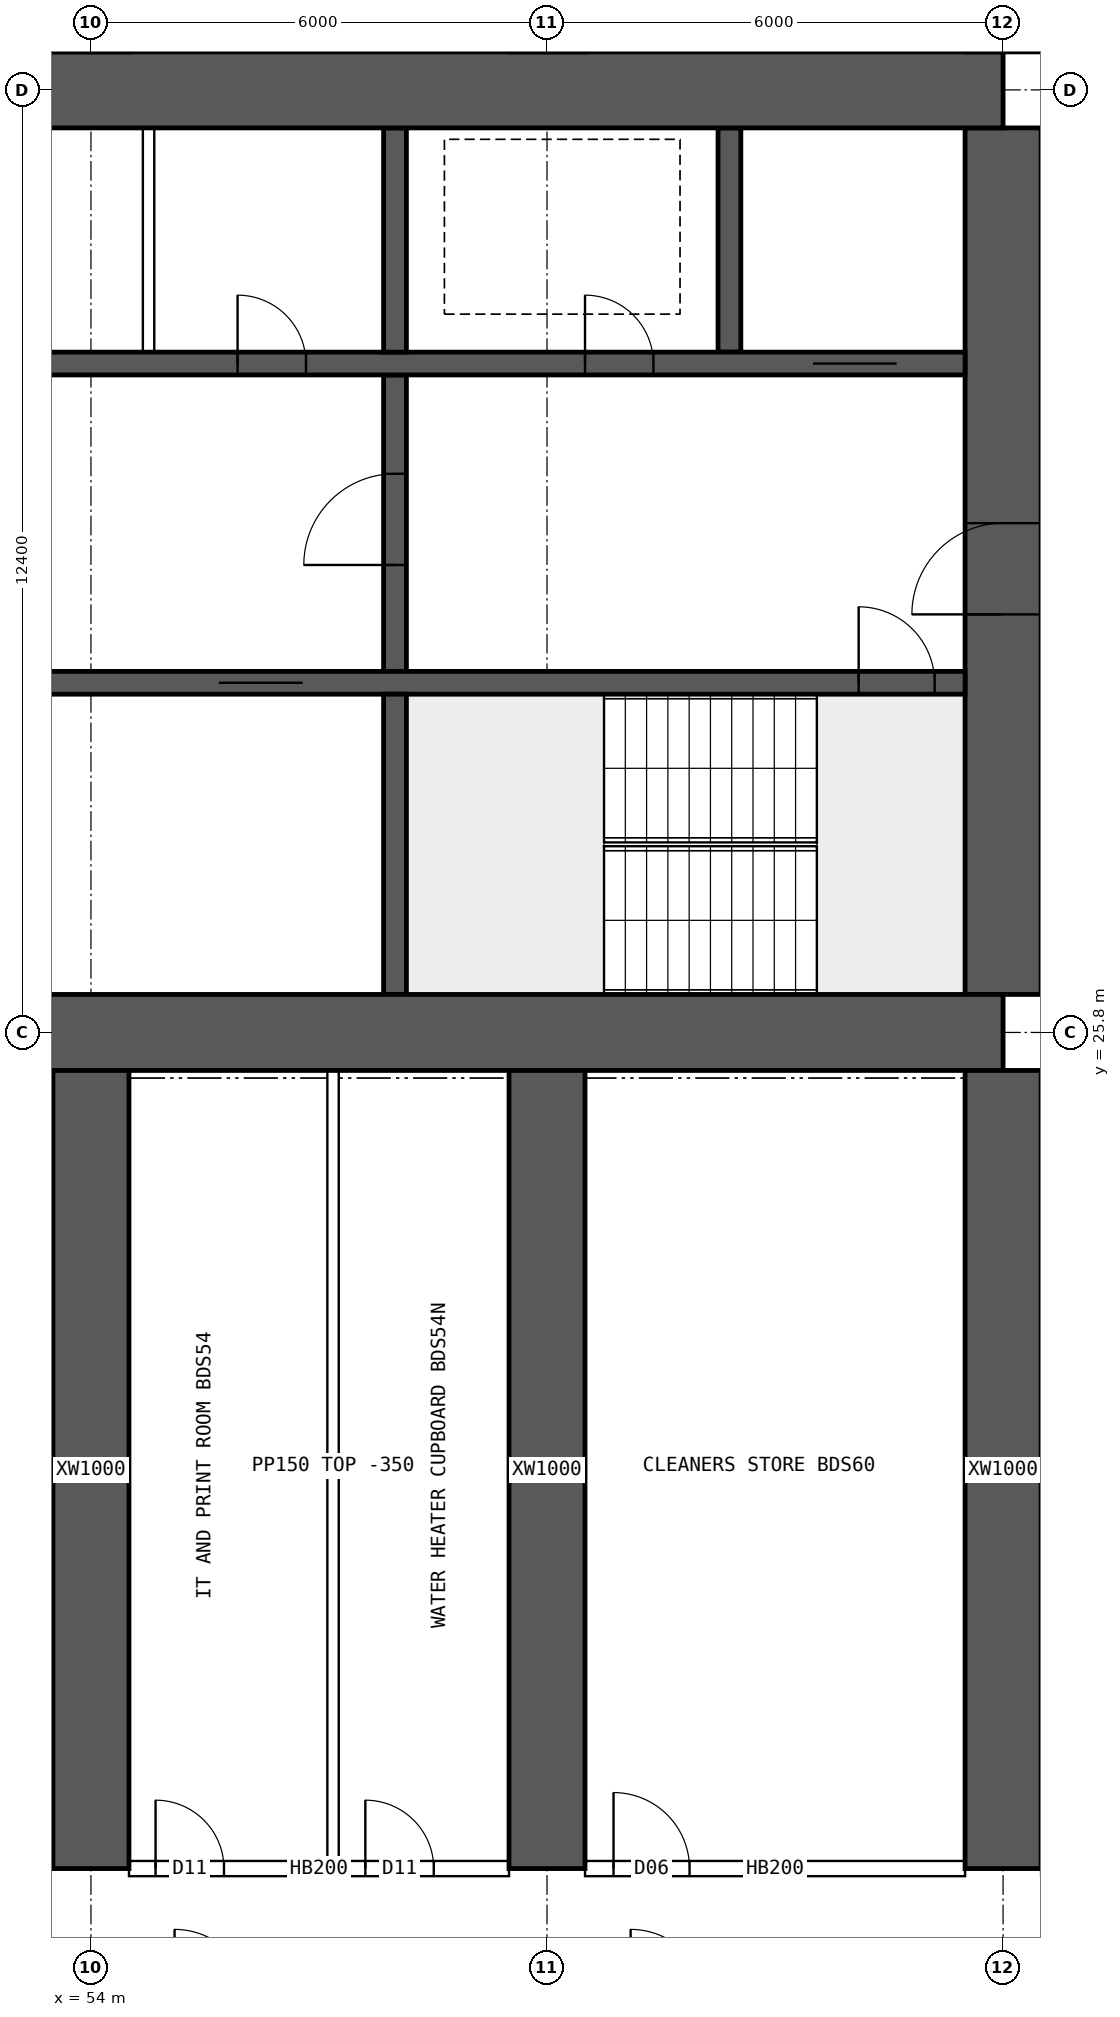
"""IFC4 building model, lengths in metres.
Left out: names, types, materials, properties, quantities, classifications, styles, units other than length and angle.
Written with IfcOpenShell. Run it as: python <this file> out.ifc"""

import sys

from ifc_helpers import new_model, si_unit, direction, frame, frame_2d, origin, place, context, subcontext, project, spatial, rectangle, extrude, element, fill, save


model = new_model("IFC4")
c1 = context("Model", 3, precision=1e-05, world=origin(), true_north=direction((0.0, 1.0)))
c2 = subcontext(c1, "Body", "Model", "MODEL_VIEW")
j1 = project(units=[si_unit("LENGTHUNIT", "METRE"), si_unit("PLANEANGLEUNIT", "RADIAN")], contexts=[c1])
p1 = place(None, origin())
s1 = spatial("IfcSite", under=j1, at=p1, CompositionType="ELEMENT")
p2 = place(p1, origin())
s2 = spatial("IfcBuilding", under=s1, at=p2, CompositionType="ELEMENT")
p3 = place(p2, frame((0.0, 0.0, 65.2)))
s3 = spatial("IfcBuildingStorey", under=s2, at=p3, CompositionType="ELEMENT", Elevation=65.2)
for number, where, z_axis, x_axis in (
    (1, (18.0, 25.8, 0.0), (0.0, 0.0, 1.0), (1.0, 0.0, 0.0)),
    (2, (18.0, 38.2, 0.0), (0.0, 0.0, 1.0), (1.0, 0.0, 0.0)),
):
    element("IfcWall", number, at=place(p3, frame(where, z_axis=z_axis, x_axis=x_axis)), inside=s3, PredefinedType="SHEAR", context=c2, shape_type="SweptSolid", body=[
        extrude(rectangle(XDim=48.0, YDim=1.0, at=frame_2d((24.0, 0.0))), origin(), (0.0, 0.0, 1.0), 3.75),
    ])
p4 = place(p3, frame((66.0, 26.3, 0.0), z_axis=(0.0, 0.0, 1.0), x_axis=(0.0, 1.0, 0.0)))
e3 = element("IfcWall", 3, at=p4, inside=s3, PredefinedType="SHEAR", context=c2, shape_type="SweptSolid", body=[
    extrude(rectangle(XDim=11.4, YDim=1.0, at=frame_2d((5.7, 0.0))), origin(), (0.0, 0.0, 1.0), 3.75),
])
p5 = place(p4, frame((5.0, 0.0, 0.0)))
e4 = element("IfcOpeningElement", 4, at=p5, cuts=e3, PredefinedType="OPENING", context=c2, shape_type="SweptSolid", body=[
    extrude(rectangle(XDim=1.2, YDim=2.1, at=frame_2d((0.6, 1.05))), frame((0.0, 0.51, 0.0), z_axis=(0.0, -1.0, 0.0), x_axis=(1.0, 0.0, 0.0)), (0.0, 0.0, 1.0), 1.02),
])
p6 = place(p3, frame((18.5, 30.4, 0.0), z_axis=(0.0, 0.0, 1.0), x_axis=(1.0, 0.0, 0.0)))
e5 = element("IfcWall", 5, at=p6, inside=s3, PredefinedType="SHEAR", context=c2, shape_type="SweptSolid", body=[
    extrude(rectangle(XDim=47.0, YDim=0.3, at=frame_2d((23.5, 0.0))), origin(), (0.0, 0.0, 1.0), 3.75),
])
p7 = place(p6, frame((0.4, 0.0, 0.0)))
e6 = element("IfcOpeningElement", 6, at=p7, cuts=e5, PredefinedType="OPENING", context=c2, shape_type="SweptSolid", body=[
    extrude(rectangle(XDim=1.0, YDim=2.1, at=frame_2d((0.5, 1.05))), frame((0.0, 0.16, 0.0), z_axis=(0.0, -1.0, 0.0), x_axis=(1.0, 0.0, 0.0)), (0.0, 0.0, 1.0), 0.32),
])
p8 = place(p6, frame((45.6, 0.0, 0.0)))
e7 = element("IfcOpeningElement", 7, at=p8, cuts=e5, PredefinedType="OPENING", context=c2, shape_type="SweptSolid", body=[
    extrude(rectangle(XDim=1.0, YDim=2.1, at=frame_2d((0.5, 1.05))), frame((0.0, 0.16, 0.0), z_axis=(0.0, -1.0, 0.0), x_axis=(1.0, 0.0, 0.0)), (0.0, 0.0, 1.0), 0.32),
])
p9 = place(p6, frame((8.25, 0.0, 0.0)))
e8 = element("IfcOpeningElement", 8, at=p9, cuts=e5, PredefinedType="OPENING", context=c2, shape_type="SweptSolid", body=[
    extrude(rectangle(XDim=1.1, YDim=2.1, at=frame_2d((0.55, 1.05))), frame((0.0, 0.16, 0.0), z_axis=(0.0, -1.0, 0.0), x_axis=(1.0, 0.0, 0.0)), (0.0, 0.0, 1.0), 0.32),
])
p10 = place(p6, frame((10.85, 0.0, 0.0)))
e9 = element("IfcOpeningElement", 9, at=p10, cuts=e5, PredefinedType="OPENING", context=c2, shape_type="SweptSolid", body=[
    extrude(rectangle(XDim=1.1, YDim=2.1, at=frame_2d((0.55, 1.05))), frame((0.0, 0.16, 0.0), z_axis=(0.0, -1.0, 0.0), x_axis=(1.0, 0.0, 0.0)), (0.0, 0.0, 1.0), 0.32),
])
p11 = place(p6, frame((13.45, 0.0, 0.0)))
e10 = element("IfcOpeningElement", 10, at=p11, cuts=e5, PredefinedType="OPENING", context=c2, shape_type="SweptSolid", body=[
    extrude(rectangle(XDim=1.1, YDim=2.1, at=frame_2d((0.55, 1.05))), frame((0.0, 0.16, 0.0), z_axis=(0.0, -1.0, 0.0), x_axis=(1.0, 0.0, 0.0)), (0.0, 0.0, 1.0), 0.32),
])
p12 = place(p6, frame((16.05, 0.0, 0.0)))
e11 = element("IfcOpeningElement", 11, at=p12, cuts=e5, PredefinedType="OPENING", context=c2, shape_type="SweptSolid", body=[
    extrude(rectangle(XDim=1.1, YDim=2.1, at=frame_2d((0.55, 1.05))), frame((0.0, 0.16, 0.0), z_axis=(0.0, -1.0, 0.0), x_axis=(1.0, 0.0, 0.0)), (0.0, 0.0, 1.0), 0.32),
])
p13 = place(p6, frame((30.117, 0.0, 0.0)))
e12 = element("IfcOpeningElement", 12, at=p13, cuts=e5, PredefinedType="OPENING", context=c2, shape_type="SweptSolid", body=[
    extrude(rectangle(XDim=1.1, YDim=2.1, at=frame_2d((0.55, 1.05))), frame((0.0, 0.16, 0.0), z_axis=(0.0, -1.0, 0.0), x_axis=(1.0, 0.0, 0.0)), (0.0, 0.0, 1.0), 0.32),
])
p14 = place(p6, frame((33.65, 0.0, 0.0)))
e13 = element("IfcOpeningElement", 13, at=p14, cuts=e5, PredefinedType="OPENING", context=c2, shape_type="SweptSolid", body=[
    extrude(rectangle(XDim=1.1, YDim=2.1, at=frame_2d((0.55, 1.05))), frame((0.0, 0.16, 0.0), z_axis=(0.0, -1.0, 0.0), x_axis=(1.0, 0.0, 0.0)), (0.0, 0.0, 1.0), 0.32),
])
p15 = place(p6, frame((37.183, 0.0, 0.0)))
e14 = element("IfcOpeningElement", 14, at=p15, cuts=e5, PredefinedType="OPENING", context=c2, shape_type="SweptSolid", body=[
    extrude(rectangle(XDim=1.1, YDim=2.1, at=frame_2d((0.55, 1.05))), frame((0.0, 0.16, 0.0), z_axis=(0.0, -1.0, 0.0), x_axis=(1.0, 0.0, 0.0)), (0.0, 0.0, 1.0), 0.32),
])
p16 = place(p3, frame((18.5, 34.6, 0.0), z_axis=(0.0, 0.0, 1.0), x_axis=(1.0, 0.0, 0.0)))
e15 = element("IfcWall", 15, at=p16, inside=s3, PredefinedType="SHEAR", context=c2, shape_type="SweptSolid", body=[
    extrude(rectangle(XDim=47.0, YDim=0.3, at=frame_2d((23.5, 0.0))), origin(), (0.0, 0.0, 1.0), 3.75),
])
p17 = place(p16, frame((0.9, 0.0, 0.0)))
e16 = element("IfcOpeningElement", 16, at=p17, cuts=e15, PredefinedType="OPENING", context=c2, shape_type="SweptSolid", body=[
    extrude(rectangle(XDim=1.1, YDim=2.1, at=frame_2d((0.55, 1.05))), frame((0.0, 0.16, 0.0), z_axis=(0.0, -1.0, 0.0), x_axis=(1.0, 0.0, 0.0)), (0.0, 0.0, 1.0), 0.32),
])
p18 = place(p16, frame((45.0, 0.0, 0.0)))
e17 = element("IfcOpeningElement", 17, at=p18, cuts=e15, PredefinedType="OPENING", context=c2, shape_type="SweptSolid", body=[
    extrude(rectangle(XDim=1.1, YDim=2.1, at=frame_2d((0.55, 1.05))), frame((0.0, 0.16, 0.0), z_axis=(0.0, -1.0, 0.0), x_axis=(1.0, 0.0, 0.0)), (0.0, 0.0, 1.0), 0.32),
])
p19 = place(p16, frame((4.1, 0.0, 0.0)))
e18 = element("IfcOpeningElement", 18, at=p19, cuts=e15, PredefinedType="OPENING", context=c2, shape_type="SweptSolid", body=[
    extrude(rectangle(XDim=0.9, YDim=2.1, at=frame_2d((0.45, 1.05))), frame((0.0, 0.16, 0.0), z_axis=(0.0, -1.0, 0.0), x_axis=(1.0, 0.0, 0.0)), (0.0, 0.0, 1.0), 0.32),
])
p20 = place(p16, frame((42.0, 0.0, 0.0)))
e19 = element("IfcOpeningElement", 19, at=p20, cuts=e15, PredefinedType="OPENING", context=c2, shape_type="SweptSolid", body=[
    extrude(rectangle(XDim=0.9, YDim=2.1, at=frame_2d((0.45, 1.05))), frame((0.0, 0.16, 0.0), z_axis=(0.0, -1.0, 0.0), x_axis=(1.0, 0.0, 0.0)), (0.0, 0.0, 1.0), 0.32),
])
p21 = place(p16, frame((8.875, 0.0, 0.0)))
e20 = element("IfcOpeningElement", 20, at=p21, cuts=e15, PredefinedType="OPENING", context=c2, shape_type="SweptSolid", body=[
    extrude(rectangle(XDim=0.9, YDim=2.1, at=frame_2d((0.45, 1.05))), frame((0.0, 0.16, 0.0), z_axis=(0.0, -1.0, 0.0), x_axis=(1.0, 0.0, 0.0)), (0.0, 0.0, 1.0), 0.32),
])
p22 = place(p16, frame((12.849, 0.0, 0.0)))
e21 = element("IfcOpeningElement", 21, at=p22, cuts=e15, PredefinedType="OPENING", context=c2, shape_type="SweptSolid", body=[
    extrude(rectangle(XDim=0.9, YDim=2.1, at=frame_2d((0.45, 1.05))), frame((0.0, 0.16, 0.0), z_axis=(0.0, -1.0, 0.0), x_axis=(1.0, 0.0, 0.0)), (0.0, 0.0, 1.0), 0.32),
])
p23 = place(p16, frame((16.496, 0.0, 0.0)))
e22 = element("IfcOpeningElement", 22, at=p23, cuts=e15, PredefinedType="OPENING", context=c2, shape_type="SweptSolid", body=[
    extrude(rectangle(XDim=0.9, YDim=2.1, at=frame_2d((0.45, 1.05))), frame((0.0, 0.16, 0.0), z_axis=(0.0, -1.0, 0.0), x_axis=(1.0, 0.0, 0.0)), (0.0, 0.0, 1.0), 0.32),
])
p24 = place(p16, frame((20.255, 0.0, 0.0)))
e23 = element("IfcOpeningElement", 23, at=p24, cuts=e15, PredefinedType="OPENING", context=c2, shape_type="SweptSolid", body=[
    extrude(rectangle(XDim=0.9, YDim=2.1, at=frame_2d((0.45, 1.05))), frame((0.0, 0.16, 0.0), z_axis=(0.0, -1.0, 0.0), x_axis=(1.0, 0.0, 0.0)), (0.0, 0.0, 1.0), 0.32),
])
p25 = place(p16, frame((24.661, 0.0, 0.0)))
e24 = element("IfcOpeningElement", 24, at=p25, cuts=e15, PredefinedType="OPENING", context=c2, shape_type="SweptSolid", body=[
    extrude(rectangle(XDim=0.9, YDim=2.1, at=frame_2d((0.45, 1.05))), frame((0.0, 0.16, 0.0), z_axis=(0.0, -1.0, 0.0), x_axis=(1.0, 0.0, 0.0)), (0.0, 0.0, 1.0), 0.32),
])
p26 = place(p16, frame((27.458, 0.0, 0.0)))
e25 = element("IfcOpeningElement", 25, at=p26, cuts=e15, PredefinedType="OPENING", context=c2, shape_type="SweptSolid", body=[
    extrude(rectangle(XDim=0.9, YDim=2.1, at=frame_2d((0.45, 1.05))), frame((0.0, 0.16, 0.0), z_axis=(0.0, -1.0, 0.0), x_axis=(1.0, 0.0, 0.0)), (0.0, 0.0, 1.0), 0.32),
])
p27 = place(p16, frame((29.831, 0.0, 0.0)))
e26 = element("IfcOpeningElement", 26, at=p27, cuts=e15, PredefinedType="OPENING", context=c2, shape_type="SweptSolid", body=[
    extrude(rectangle(XDim=0.9, YDim=2.1, at=frame_2d((0.45, 1.05))), frame((0.0, 0.16, 0.0), z_axis=(0.0, -1.0, 0.0), x_axis=(1.0, 0.0, 0.0)), (0.0, 0.0, 1.0), 0.32),
])
p28 = place(p16, frame((33.68, 0.0, 0.0)))
e27 = element("IfcOpeningElement", 27, at=p28, cuts=e15, PredefinedType="OPENING", context=c2, shape_type="SweptSolid", body=[
    extrude(rectangle(XDim=0.9, YDim=2.1, at=frame_2d((0.45, 1.05))), frame((0.0, 0.16, 0.0), z_axis=(0.0, -1.0, 0.0), x_axis=(1.0, 0.0, 0.0)), (0.0, 0.0, 1.0), 0.32),
])
p29 = place(p16, frame((37.429, 0.0, 0.0)))
e28 = element("IfcOpeningElement", 28, at=p29, cuts=e15, PredefinedType="OPENING", context=c2, shape_type="SweptSolid", body=[
    extrude(rectangle(XDim=0.9, YDim=2.1, at=frame_2d((0.45, 1.05))), frame((0.0, 0.16, 0.0), z_axis=(0.0, -1.0, 0.0), x_axis=(1.0, 0.0, 0.0)), (0.0, 0.0, 1.0), 0.32),
])
p30 = place(p3, frame((58.0, 26.3, 0.0), z_axis=(0.0, 0.0, 1.0), x_axis=(0.0, 1.0, 0.0)))
e29 = element("IfcWall", 29, at=p30, inside=s3, PredefinedType="SHEAR", context=c2, shape_type="SweptSolid", body=[
    extrude(rectangle(XDim=3.95, YDim=0.3, at=frame_2d((1.975, 0.0))), origin(), (0.0, 0.0, 1.0), 3.75),
])
p31 = place(p3, frame((58.0, 30.55, 0.0), z_axis=(0.0, 0.0, 1.0), x_axis=(0.0, 1.0, 0.0)))
e30 = element("IfcWall", 30, at=p31, inside=s3, PredefinedType="SHEAR", context=c2, shape_type="SweptSolid", body=[
    extrude(rectangle(XDim=3.9, YDim=0.3, at=frame_2d((1.95, 0.0))), origin(), (0.0, 0.0, 1.0), 3.75),
])
p32 = place(p31, frame((1.4, 0.0, 0.0)))
e31 = element("IfcOpeningElement", 31, at=p32, cuts=e30, PredefinedType="OPENING", context=c2, shape_type="SweptSolid", body=[
    extrude(rectangle(XDim=1.2, YDim=2.1, at=frame_2d((0.6, 1.05))), frame((0.0, 0.16, 0.0), z_axis=(0.0, -1.0, 0.0), x_axis=(1.0, 0.0, 0.0)), (0.0, 0.0, 1.0), 0.32),
])
for number, where, z_axis, x_axis in (
    (32, (62.4, 34.75, 0.0), (0.0, 0.0, 1.0), (0.0, 1.0, 0.0)),
    (33, (58.0, 34.75, 0.0), (0.0, 0.0, 1.0), (0.0, 1.0, 0.0)),
):
    element("IfcWall", number, at=place(p3, frame(where, z_axis=z_axis, x_axis=x_axis)), inside=s3, PredefinedType="SHEAR", context=c2, shape_type="SweptSolid", body=[
        extrude(rectangle(XDim=2.95, YDim=0.3, at=frame_2d((1.475, 0.0))), origin(), (0.0, 0.0, 1.0), 3.75),
    ])
for number, where, z_axis, x_axis in (
    (34, (54.0, 14.8, 0.0), (0.0, 0.0, 1.0), (0.0, 1.0, 0.0)),
    (35, (60.0, 14.8, 0.0), (0.0, 0.0, 1.0), (0.0, 1.0, 0.0)),
    (36, (66.0, 14.8, 0.0), (0.0, 0.0, 1.0), (0.0, 1.0, 0.0)),
):
    element("IfcWall", number, at=place(p3, frame(where, z_axis=z_axis, x_axis=x_axis)), inside=s3, PredefinedType="SHEAR", context=c2, shape_type="SweptSolid", body=[
        extrude(rectangle(XDim=10.5, YDim=1.0, at=frame_2d((5.25, 0.0))), origin(), (0.0, 0.0, 1.0), 3.75),
    ])
p33 = place(p3, frame((54.758, 34.75, 0.0), z_axis=(0.0, 0.0, 1.0), x_axis=(0.0, 1.0, 0.0)))
e37 = element("IfcWall", 37, at=p33, inside=s3, PredefinedType="SOLIDWALL", context=c2, shape_type="SweptSolid", body=[
    extrude(rectangle(XDim=2.95, YDim=0.15, at=frame_2d((1.475, 0.0))), origin(), (0.0, 0.0, 1.0), 3.4),
])
p34 = place(p3, frame((54.5, 14.8, 0.0), z_axis=(0.0, 0.0, 1.0), x_axis=(1.0, 0.0, 0.0)))
e38 = element("IfcWall", 38, at=p34, inside=s3, PredefinedType="SOLIDWALL", context=c2, shape_type="SweptSolid", body=[
    extrude(rectangle(XDim=5.0, YDim=0.2, at=frame_2d((2.5, 0.0))), origin(), (0.0, 0.0, 1.0), 3.4),
])
p35 = place(p34, frame((0.35, 0.0, 0.0)))
e39 = element("IfcOpeningElement", 39, at=p35, cuts=e38, PredefinedType="OPENING", context=c2, shape_type="SweptSolid", body=[
    extrude(rectangle(XDim=0.9, YDim=2.1, at=frame_2d((0.45, 1.05))), frame((0.0, 0.11, 0.0), z_axis=(0.0, -1.0, 0.0), x_axis=(1.0, 0.0, 0.0)), (0.0, 0.0, 1.0), 0.22),
])
p36 = place(p34, frame((3.11, 0.0, 0.0)))
e40 = element("IfcOpeningElement", 40, at=p36, cuts=e38, PredefinedType="OPENING", context=c2, shape_type="SweptSolid", body=[
    extrude(rectangle(XDim=0.9, YDim=2.1, at=frame_2d((0.45, 1.05))), frame((0.0, 0.11, 0.0), z_axis=(0.0, -1.0, 0.0), x_axis=(1.0, 0.0, 0.0)), (0.0, 0.0, 1.0), 0.22),
])
p37 = place(p3, frame((60.5, 14.8, 0.0), z_axis=(0.0, 0.0, 1.0), x_axis=(1.0, 0.0, 0.0)))
e41 = element("IfcWall", 41, at=p37, inside=s3, PredefinedType="SOLIDWALL", context=c2, shape_type="SweptSolid", body=[
    extrude(rectangle(XDim=5.0, YDim=0.2, at=frame_2d((2.5, 0.0))), origin(), (0.0, 0.0, 1.0), 3.4),
])
p38 = place(p37, frame((0.375, 0.0, 0.0)))
e42 = element("IfcOpeningElement", 42, at=p38, cuts=e41, PredefinedType="OPENING", context=c2, shape_type="SweptSolid", body=[
    extrude(rectangle(XDim=1.0, YDim=2.1, at=frame_2d((0.5, 1.05))), frame((0.0, 0.11, 0.0), z_axis=(0.0, -1.0, 0.0), x_axis=(1.0, 0.0, 0.0)), (0.0, 0.0, 1.0), 0.22),
])
p39 = place(p3, frame((57.185, 14.9, 0.0), z_axis=(0.0, 0.0, 1.0), x_axis=(0.0, 1.0, 0.0)))
e43 = element("IfcWall", 43, at=p39, inside=s3, PredefinedType="PARTITIONING", context=c2, shape_type="SweptSolid", body=[
    extrude(rectangle(XDim=10.4, YDim=0.15, at=frame_2d((5.2, 0.0))), origin(), (0.0, 0.0, 1.0), 3.4),
])
p40 = place(p5, origin())
e44 = element("IfcDoor", 44, at=p40, inside=s3, OperationType="SINGLE_SWING_LEFT", PredefinedType="DOOR", context=c2, shape_type="SweptSolid", body=[
    extrude(rectangle(XDim=1.2, YDim=2.1, at=frame_2d((0.6, 1.05))), frame((0.0, 0.025, 0.0), z_axis=(0.0, -1.0, 0.0), x_axis=(1.0, 0.0, 0.0)), (0.0, 0.0, 1.0), 0.05),
])
fill(e4, e44)
p41 = place(p8, origin())
e45 = element("IfcDoor", 45, at=p41, inside=s3, OperationType="SINGLE_SWING_LEFT", PredefinedType="DOOR", context=c2, shape_type="SweptSolid", body=[
    extrude(rectangle(XDim=1.0, YDim=2.1, at=frame_2d((0.5, 1.05))), frame((0.0, 0.025, 0.0), z_axis=(0.0, -1.0, 0.0), x_axis=(1.0, 0.0, 0.0)), (0.0, 0.0, 1.0), 0.05),
])
fill(e7, e45)
p42 = place(p18, origin())
e46 = element("IfcDoor", 46, at=p42, inside=s3, OperationType="DOUBLE_DOOR_SLIDING", PredefinedType="DOOR", context=c2, shape_type="SweptSolid", body=[
    extrude(rectangle(XDim=1.1, YDim=2.1, at=frame_2d((0.55, 1.05))), frame((0.0, 0.025, 0.0), z_axis=(0.0, -1.0, 0.0), x_axis=(1.0, 0.0, 0.0)), (0.0, 0.0, 1.0), 0.05),
])
fill(e17, e46)
p43 = place(p20, origin())
e47 = element("IfcDoor", 47, at=p43, inside=s3, OperationType="SINGLE_SWING_LEFT", PredefinedType="DOOR", context=c2, shape_type="SweptSolid", body=[
    extrude(rectangle(XDim=0.9, YDim=2.1, at=frame_2d((0.45, 1.05))), frame((0.0, 0.025, 0.0), z_axis=(0.0, -1.0, 0.0), x_axis=(1.0, 0.0, 0.0)), (0.0, 0.0, 1.0), 0.05),
])
fill(e19, e47)
p44 = place(p32, origin())
e48 = element("IfcDoor", 48, at=p44, inside=s3, OperationType="SINGLE_SWING_LEFT", PredefinedType="DOOR", context=c2, shape_type="SweptSolid", body=[
    extrude(rectangle(XDim=1.2, YDim=2.1, at=frame_2d((0.6, 1.05))), frame((0.0, 0.025, 0.0), z_axis=(0.0, -1.0, 0.0), x_axis=(1.0, 0.0, 0.0)), (0.0, 0.0, 1.0), 0.05),
])
fill(e31, e48)
p45 = place(p29, origin())
e49 = element("IfcDoor", 49, at=p45, inside=s3, OperationType="SINGLE_SWING_LEFT", PredefinedType="DOOR", context=c2, shape_type="SweptSolid", body=[
    extrude(rectangle(XDim=0.9, YDim=2.1, at=frame_2d((0.45, 1.05))), frame((0.0, 0.025, 0.0), z_axis=(0.0, -1.0, 0.0), x_axis=(1.0, 0.0, 0.0)), (0.0, 0.0, 1.0), 0.05),
])
fill(e28, e49)
p46 = place(p15, origin())
e50 = element("IfcDoor", 50, at=p46, inside=s3, OperationType="DOUBLE_DOOR_SLIDING", PredefinedType="DOOR", context=c2, shape_type="SweptSolid", body=[
    extrude(rectangle(XDim=1.1, YDim=2.1, at=frame_2d((0.55, 1.05))), frame((0.0, 0.025, 0.0), z_axis=(0.0, -1.0, 0.0), x_axis=(1.0, 0.0, 0.0)), (0.0, 0.0, 1.0), 0.05),
])
fill(e14, e50)
p47 = place(p35, origin())
e51 = element("IfcDoor", 51, at=p47, inside=s3, OperationType="SINGLE_SWING_LEFT", PredefinedType="DOOR", context=c2, shape_type="SweptSolid", body=[
    extrude(rectangle(XDim=0.9, YDim=2.1, at=frame_2d((0.45, 1.05))), frame((0.0, 0.025, 0.0), z_axis=(0.0, -1.0, 0.0), x_axis=(1.0, 0.0, 0.0)), (0.0, 0.0, 1.0), 0.05),
])
fill(e39, e51)
p48 = place(p36, origin())
e52 = element("IfcDoor", 52, at=p48, inside=s3, OperationType="SINGLE_SWING_LEFT", PredefinedType="DOOR", context=c2, shape_type="SweptSolid", body=[
    extrude(rectangle(XDim=0.9, YDim=2.1, at=frame_2d((0.45, 1.05))), frame((0.0, 0.025, 0.0), z_axis=(0.0, -1.0, 0.0), x_axis=(1.0, 0.0, 0.0)), (0.0, 0.0, 1.0), 0.05),
])
fill(e40, e52)
p49 = place(p38, origin())
e53 = element("IfcDoor", 53, at=p49, inside=s3, OperationType="SINGLE_SWING_LEFT", PredefinedType="DOOR", context=c2, shape_type="SweptSolid", body=[
    extrude(rectangle(XDim=1.0, YDim=2.1, at=frame_2d((0.5, 1.05))), frame((0.0, 0.025, 0.0), z_axis=(0.0, -1.0, 0.0), x_axis=(1.0, 0.0, 0.0)), (0.0, 0.0, 1.0), 0.05),
])
fill(e42, e53)
save(model, sys.argv[1])
